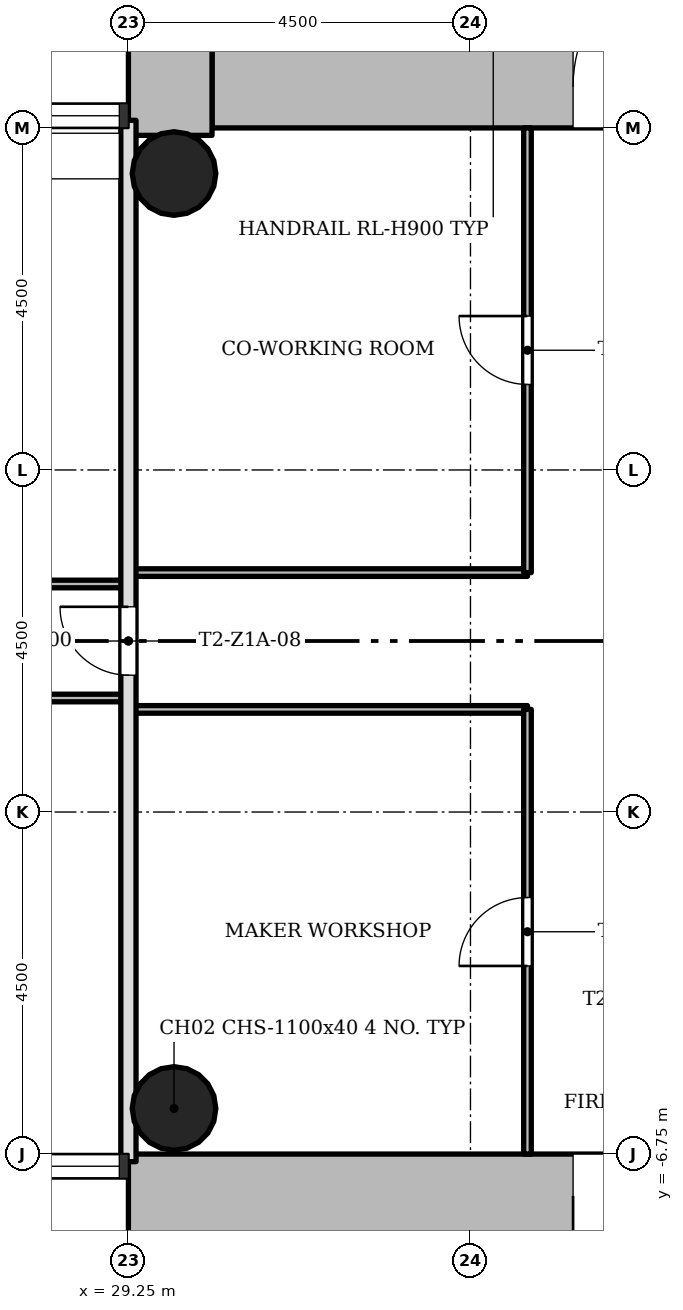
"""IFC4 building model, lengths in metres.
Left out: names, types, materials, properties, quantities, classifications, styles, units other than length and angle.
Written with IfcOpenShell. Run it as: python <this file> out.ifc"""

import sys

from ifc_helpers import new_model, si_unit, direction, frame, frame_2d, origin, origin_2d, place, context, subcontext, project, spatial, rectangle, hollow_circle, extrude, element, fill, save


model = new_model("IFC4")
c1 = context("Model", 3, precision=1e-05, world=origin(), true_north=direction((0.0, 1.0)))
c2 = subcontext(c1, "Body", "Model", "MODEL_VIEW")
j1 = project(units=[si_unit("LENGTHUNIT", "METRE"), si_unit("PLANEANGLEUNIT", "RADIAN")], contexts=[c1])
p1 = place(None, origin())
s1 = spatial("IfcSite", under=j1, at=p1, CompositionType="ELEMENT")
p2 = place(p1, origin())
s2 = spatial("IfcBuilding", under=s1, at=p2, CompositionType="ELEMENT")
p3 = place(p2, frame((0.0, 0.0, 31.3)))
s3 = spatial("IfcBuildingStorey", under=s2, at=p3, CompositionType="ELEMENT", Elevation=31.3)
p4 = place(p3, frame((30.35, 7.3, 0.0), z_axis=(0.0, 0.0, 1.0), x_axis=(1.0, 0.0, 0.0)))
e1 = element("IfcWall", 1, at=p4, inside=s3, PredefinedType="SHEAR", context=c2, shape_type="SweptSolid", body=[
    extrude(rectangle(XDim=12.4, YDim=1.1, at=frame_2d((6.2, 0.0))), origin(), (0.0, 0.0, 1.0), 3.4),
])
p5 = place(p4, frame((4.75, 0.0, 0.0)))
e2 = element("IfcOpeningElement", 2, at=p5, cuts=e1, PredefinedType="OPENING", context=c2, shape_type="SweptSolid", body=[
    extrude(rectangle(XDim=1.8, YDim=2.1, at=frame_2d((0.9, 1.05))), frame((0.0, 0.56, 0.0), z_axis=(0.0, -1.0, 0.0), x_axis=(1.0, 0.0, 0.0)), (0.0, 0.0, 1.0), 1.12),
])
p6 = place(p3, frame((29.8, 15.248, 0.0), z_axis=(0.0, 0.0, 1.0), x_axis=(0.0, -1.0, 0.0)))
e3 = element("IfcWall", 3, at=p6, inside=s3, PredefinedType="SHEAR", context=c2, shape_type="SweptSolid", body=[
    extrude(rectangle(XDim=8.596, YDim=1.1, at=frame_2d((4.298, 0.0))), origin(), (0.0, 0.0, 1.0), 3.4),
])
p7 = place(p3, frame((41.65, -7.3, 0.0), z_axis=(0.0, 0.0, 1.0), x_axis=(-1.0, 0.0, 0.0)))
e4 = element("IfcWall", 4, at=p7, inside=s3, PredefinedType="SHEAR", context=c2, shape_type="SweptSolid", body=[
    extrude(rectangle(XDim=12.4, YDim=1.1, at=frame_2d((6.2, 0.0))), origin(), (0.0, 0.0, 1.0), 3.4),
])
p8 = place(p7, frame((4.75, 0.0, 0.0)))
e5 = element("IfcOpeningElement", 5, at=p8, cuts=e4, PredefinedType="OPENING", context=c2, shape_type="SweptSolid", body=[
    extrude(rectangle(XDim=1.8, YDim=2.1, at=frame_2d((0.9, 1.05))), frame((0.0, 0.56, 0.0), z_axis=(0.0, -1.0, 0.0), x_axis=(1.0, 0.0, 0.0)), (0.0, 0.0, 1.0), 1.12),
])
for number, where, z_axis, x_axis in (
    (6, (29.85, 6.15, 0.0), (0.0, 0.0, 1.0), (1.0, 0.0, 0.0)),
    (7, (29.85, -6.15, 0.0), (0.0, 0.0, 1.0), (1.0, 0.0, 0.0)),
):
    element("IfcColumn", number, at=place(p3, frame(where, z_axis=z_axis, x_axis=x_axis)), inside=s3, PredefinedType="COLUMN", context=c2, shape_type="SweptSolid", body=[
        extrude(hollow_circle(Radius=0.55, WallThickness=0.04, at=origin_2d()), origin(), (0.0, 0.0, 1.0), 3.4),
    ])
p9 = place(p3, frame((34.5, -0.9, 0.0), z_axis=(0.0, 0.0, 1.0), x_axis=(-1.0, 0.0, 0.0)))
e8 = element("IfcWall", 8, at=p9, inside=s3, PredefinedType="PARTITIONING", context=c2, shape_type="SweptSolid", body=[
    extrude(rectangle(XDim=5.25, YDim=0.1, at=frame_2d((2.625, 0.0))), origin(), (0.0, 0.0, 1.0), 3.0),
])
p10 = place(p3, frame((29.25, -0.75, 0.0), z_axis=(0.0, 0.0, 1.0), x_axis=(-1.0, 0.0, 0.0)))
e9 = element("IfcWall", 9, at=p10, inside=s3, PredefinedType="PARTITIONING", context=c2, shape_type="SweptSolid", body=[
    extrude(rectangle(XDim=7.8, YDim=0.1, at=frame_2d((3.9, 0.0))), origin(), (0.0, 0.0, 1.0), 3.0),
])
p11 = place(p10, frame((1.8, 0.0, 0.0)))
e10 = element("IfcOpeningElement", 10, at=p11, cuts=e9, PredefinedType="OPENING", context=c2, shape_type="SweptSolid", body=[
    extrude(rectangle(XDim=0.9, YDim=2.1, at=frame_2d((0.45, 1.05))), frame((0.0, 0.06, 0.0), z_axis=(0.0, -1.0, 0.0), x_axis=(1.0, 0.0, 0.0)), (0.0, 0.0, 1.0), 0.12),
])
p12 = place(p10, frame((4.95, 0.0, 0.0)))
e11 = element("IfcOpeningElement", 11, at=p12, cuts=e9, PredefinedType="OPENING", context=c2, shape_type="SweptSolid", body=[
    extrude(rectangle(XDim=0.9, YDim=2.1, at=frame_2d((0.45, 1.05))), frame((0.0, 0.06, 0.0), z_axis=(0.0, -1.0, 0.0), x_axis=(1.0, 0.0, 0.0)), (0.0, 0.0, 1.0), 0.12),
])
p13 = place(p10, frame((6.6, 0.0, 0.0)))
e12 = element("IfcOpeningElement", 12, at=p13, cuts=e9, PredefinedType="OPENING", context=c2, shape_type="SweptSolid", body=[
    extrude(rectangle(XDim=0.9, YDim=2.1, at=frame_2d((0.45, 1.05))), frame((0.0, 0.06, 0.0), z_axis=(0.0, -1.0, 0.0), x_axis=(1.0, 0.0, 0.0)), (0.0, 0.0, 1.0), 0.12),
])
p14 = place(p3, frame((29.25, 0.75, 0.0), z_axis=(0.0, 0.0, 1.0), x_axis=(-1.0, 0.0, 0.0)))
e13 = element("IfcWall", 13, at=p14, inside=s3, PredefinedType="PARTITIONING", context=c2, shape_type="SweptSolid", body=[
    extrude(rectangle(XDim=4.5, YDim=0.1, at=frame_2d((2.25, 0.0))), origin(), (0.0, 0.0, 1.0), 3.0),
])
p15 = place(p14, frame((1.8, 0.0, 0.0)))
e14 = element("IfcOpeningElement", 14, at=p15, cuts=e13, PredefinedType="OPENING", context=c2, shape_type="SweptSolid", body=[
    extrude(rectangle(XDim=0.9, YDim=2.1, at=frame_2d((0.45, 1.05))), frame((0.0, 0.06, 0.0), z_axis=(0.0, -1.0, 0.0), x_axis=(1.0, 0.0, 0.0)), (0.0, 0.0, 1.0), 0.12),
])
p16 = place(p3, frame((34.5, 0.9, 0.0), z_axis=(0.0, 0.0, 1.0), x_axis=(-1.0, 0.0, 0.0)))
e15 = element("IfcWall", 15, at=p16, inside=s3, PredefinedType="PARTITIONING", context=c2, shape_type="SweptSolid", body=[
    extrude(rectangle(XDim=5.25, YDim=0.1, at=frame_2d((2.625, 0.0))), origin(), (0.0, 0.0, 1.0), 3.0),
])
p17 = place(p3, frame((34.5, -6.75, 0.0), z_axis=(0.0, 0.0, 1.0), x_axis=(0.0, 1.0, 0.0)))
e16 = element("IfcWall", 16, at=p17, inside=s3, PredefinedType="PARTITIONING", context=c2, shape_type="SweptSolid", body=[
    extrude(rectangle(XDim=5.85, YDim=0.1, at=frame_2d((2.925, 0.0))), origin(), (0.0, 0.0, 1.0), 3.0),
])
p18 = place(p17, frame((2.475, 0.0, 0.0)))
e17 = element("IfcOpeningElement", 17, at=p18, cuts=e16, PredefinedType="OPENING", context=c2, shape_type="SweptSolid", body=[
    extrude(rectangle(XDim=0.9, YDim=2.1, at=frame_2d((0.45, 1.05))), frame((0.0, 0.06, 0.0), z_axis=(0.0, -1.0, 0.0), x_axis=(1.0, 0.0, 0.0)), (0.0, 0.0, 1.0), 0.12),
])
p19 = place(p3, frame((34.5, 0.9, 0.0), z_axis=(0.0, 0.0, 1.0), x_axis=(0.0, 1.0, 0.0)))
e18 = element("IfcWall", 18, at=p19, inside=s3, PredefinedType="PARTITIONING", context=c2, shape_type="SweptSolid", body=[
    extrude(rectangle(XDim=5.85, YDim=0.1, at=frame_2d((2.925, 0.0))), origin(), (0.0, 0.0, 1.0), 3.0),
])
p20 = place(p19, frame((2.475, 0.0, 0.0)))
e19 = element("IfcOpeningElement", 19, at=p20, cuts=e18, PredefinedType="OPENING", context=c2, shape_type="SweptSolid", body=[
    extrude(rectangle(XDim=0.9, YDim=2.1, at=frame_2d((0.45, 1.05))), frame((0.0, 0.06, 0.0), z_axis=(0.0, -1.0, 0.0), x_axis=(1.0, 0.0, 0.0)), (0.0, 0.0, 1.0), 0.12),
])
p21 = place(p3, frame((29.25, -6.85, 0.0), z_axis=(0.0, 0.0, 1.0), x_axis=(0.0, 1.0, 0.0)))
e20 = element("IfcWall", 20, at=p21, inside=s3, PredefinedType="SOLIDWALL", context=c2, shape_type="SweptSolid", body=[
    extrude(rectangle(XDim=13.7, YDim=0.2, at=frame_2d((6.85, 0.0))), origin(), (0.0, 0.0, 1.0), 3.0),
])
p22 = place(p21, frame((6.4, 0.0, 0.0)))
e21 = element("IfcOpeningElement", 21, at=p22, cuts=e20, PredefinedType="OPENING", context=c2, shape_type="SweptSolid", body=[
    extrude(rectangle(XDim=0.9, YDim=2.1, at=frame_2d((0.45, 1.05))), frame((0.0, 0.11, 0.0), z_axis=(0.0, -1.0, 0.0), x_axis=(1.0, 0.0, 0.0)), (0.0, 0.0, 1.0), 0.22),
])
p23 = place(p20, origin())
e22 = element("IfcDoor", 22, at=p23, inside=s3, OperationType="SINGLE_SWING_LEFT", PredefinedType="DOOR", context=c2, shape_type="SweptSolid", body=[
    extrude(rectangle(XDim=0.9, YDim=2.1, at=frame_2d((0.45, 1.05))), frame((0.0, 0.025, 0.0), z_axis=(0.0, -1.0, 0.0), x_axis=(1.0, 0.0, 0.0)), (0.0, 0.0, 1.0), 0.05),
])
fill(e19, e22)
p24 = place(p18, origin())
e23 = element("IfcDoor", 23, at=p24, inside=s3, OperationType="SINGLE_SWING_RIGHT", PredefinedType="DOOR", context=c2, shape_type="SweptSolid", body=[
    extrude(rectangle(XDim=0.9, YDim=2.1, at=frame_2d((0.45, 1.05))), frame((0.0, 0.025, 0.0), z_axis=(0.0, -1.0, 0.0), x_axis=(1.0, 0.0, 0.0)), (0.0, 0.0, 1.0), 0.05),
])
fill(e17, e23)
p25 = place(p22, origin())
e24 = element("IfcDoor", 24, at=p25, inside=s3, OperationType="SINGLE_SWING_LEFT", PredefinedType="DOOR", context=c2, shape_type="SweptSolid", body=[
    extrude(rectangle(XDim=0.9, YDim=2.1, at=frame_2d((0.45, 1.05))), frame((0.0, 0.025, 0.0), z_axis=(0.0, -1.0, 0.0), x_axis=(1.0, 0.0, 0.0)), (0.0, 0.0, 1.0), 0.05),
])
fill(e21, e24)
p26 = place(p5, origin())
e25 = element("IfcDoor", 25, at=p26, inside=s3, OperationType="SINGLE_SWING_LEFT", PredefinedType="DOOR", context=c2, shape_type="SweptSolid", body=[
    extrude(rectangle(XDim=1.8, YDim=2.1, at=frame_2d((0.9, 1.05))), frame((0.0, 0.025, 0.0), z_axis=(0.0, -1.0, 0.0), x_axis=(1.0, 0.0, 0.0)), (0.0, 0.0, 1.0), 0.05),
])
fill(e2, e25)
p27 = place(p8, origin())
e26 = element("IfcDoor", 26, at=p27, inside=s3, OperationType="SINGLE_SWING_LEFT", PredefinedType="DOOR", context=c2, shape_type="SweptSolid", body=[
    extrude(rectangle(XDim=1.8, YDim=2.1, at=frame_2d((0.9, 1.05))), frame((0.0, 0.025, 0.0), z_axis=(0.0, -1.0, 0.0), x_axis=(1.0, 0.0, 0.0)), (0.0, 0.0, 1.0), 0.05),
])
fill(e5, e26)
save(model, sys.argv[1])
